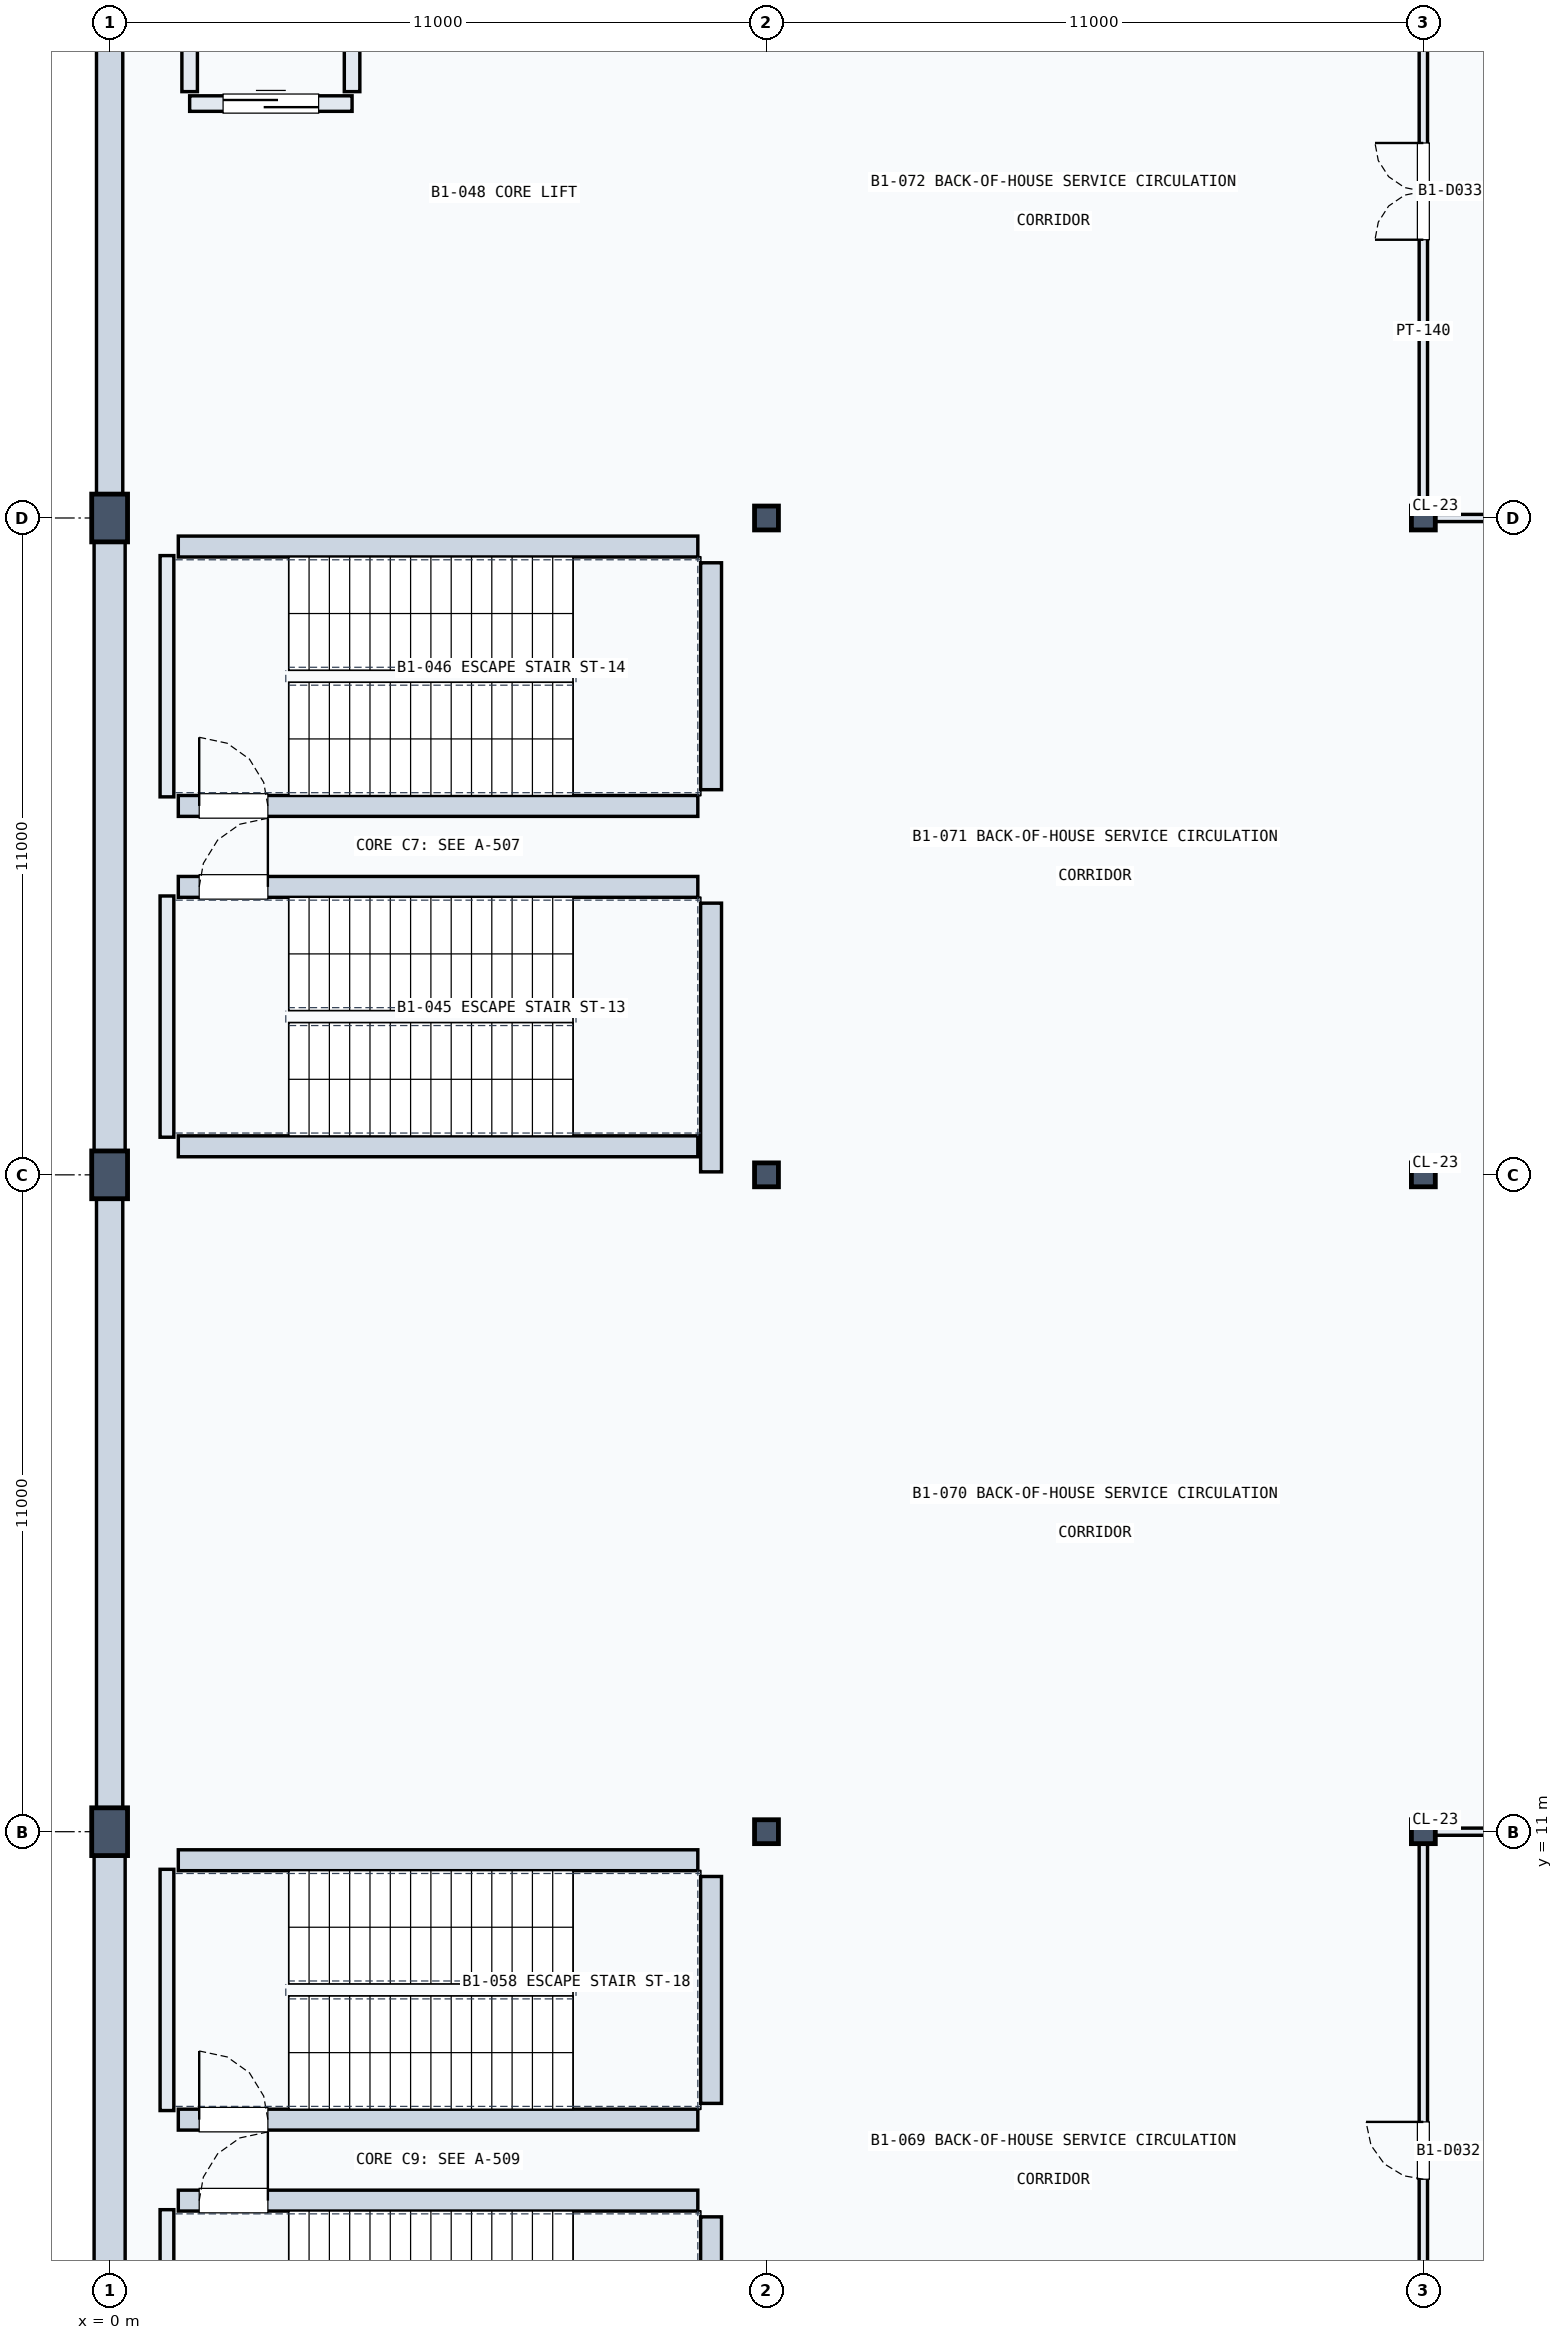
"""IFC4 building model, lengths in metres.
Left out: names, types, materials, properties, quantities, classifications, styles, units other than length and angle.
Written with IfcOpenShell. Run it as: python <this file> out.ifc"""

import sys

from ifc_helpers import new_model, si_unit, direction, frame, frame_2d, origin, origin_2d, place, context, subcontext, project, spatial, rectangle, hollow_rectangle, extrude, element, fill, save


model = new_model("IFC4")
c1 = context("Model", 3, precision=1e-05, world=origin(), true_north=direction((0.0, 1.0)))
c2 = subcontext(c1, "Body", "Model", "MODEL_VIEW")
j1 = project(units=[si_unit("LENGTHUNIT", "METRE"), si_unit("PLANEANGLEUNIT", "RADIAN")], contexts=[c1])
p1 = place(None, origin())
s1 = spatial("IfcSite", under=j1, at=p1, CompositionType="ELEMENT")
p2 = place(p1, origin())
s2 = spatial("IfcBuilding", under=s1, at=p2, CompositionType="ELEMENT")
p3 = place(p2, frame((0.0, 0.0, -5.4)))
s3 = spatial("IfcBuildingStorey", under=s2, at=p3, CompositionType="ELEMENT", Elevation=-5.4)
for number, where, z_axis, x_axis in (
    (1, (0.0, 11.0, 0.0), (0.0, 0.0, 1.0), (1.0, 0.0, 0.0)),
    (2, (0.0, 22.0, 0.0), (0.0, 0.0, 1.0), (1.0, 0.0, 0.0)),
    (3, (0.0, 33.0, 0.0), (0.0, 0.0, 1.0), (1.0, 0.0, 0.0)),
):
    element("IfcColumn", number, at=place(p3, frame(where, z_axis=z_axis, x_axis=x_axis)), inside=s3, PredefinedType="COLUMN", context=c2, shape_type="SweptSolid", body=[
        extrude(rectangle(XDim=0.6, YDim=0.8, at=origin_2d()), origin(), (0.0, 0.0, 1.0), 5.4),
    ])
for number, where, z_axis, x_axis in (
    (4, (11.0, 11.0, 0.0), (0.0, 0.0, 1.0), (1.0, 0.0, 0.0)),
    (5, (11.0, 22.0, 0.0), (0.0, 0.0, 1.0), (1.0, 0.0, 0.0)),
    (6, (11.0, 33.0, 0.0), (0.0, 0.0, 1.0), (1.0, 0.0, 0.0)),
    (7, (22.0, 11.0, 0.0), (0.0, 0.0, 1.0), (1.0, 0.0, 0.0)),
    (8, (22.0, 22.0, 0.0), (0.0, 0.0, 1.0), (1.0, 0.0, 0.0)),
    (9, (22.0, 33.0, 0.0), (0.0, 0.0, 1.0), (1.0, 0.0, 0.0)),
):
    element("IfcColumn", number, at=place(p3, frame(where, z_axis=z_axis, x_axis=x_axis)), inside=s3, PredefinedType="COLUMN", context=c2, shape_type="SweptSolid", body=[
        extrude(hollow_rectangle(XDim=0.4, YDim=0.4, WallThickness=0.02, at=origin_2d()), origin(), (0.0, 0.0, 1.0), 5.4),
    ])
p4 = place(p3, frame((0.0, 0.22, 0.0), z_axis=(0.0, 0.0, 1.0), x_axis=(0.0, 1.0, 0.0)))
e10 = element("IfcWall", 10, at=p4, inside=s3, PredefinedType="SOLIDWALL", context=c2, shape_type="SweptSolid", body=[
    extrude(rectangle(XDim=10.56, YDim=0.52, at=frame_2d((5.28, 0.0))), origin(), (0.0, 0.0, 1.0), 4.23),
])
p5 = place(p3, frame((0.0, 11.22, 0.0), z_axis=(0.0, 0.0, 1.0), x_axis=(0.0, 1.0, 0.0)))
e11 = element("IfcWall", 11, at=p5, inside=s3, PredefinedType="SOLIDWALL", context=c2, shape_type="SweptSolid", body=[
    extrude(rectangle(XDim=10.56, YDim=0.44, at=frame_2d((5.28, 0.0))), origin(), (0.0, 0.0, 1.0), 4.23),
])
p6 = place(p3, frame((0.0, 22.22, 0.0), z_axis=(0.0, 0.0, 1.0), x_axis=(0.0, 1.0, 0.0)))
e12 = element("IfcWall", 12, at=p6, inside=s3, PredefinedType="SOLIDWALL", context=c2, shape_type="SweptSolid", body=[
    extrude(rectangle(XDim=10.56, YDim=0.52, at=frame_2d((5.28, 0.0))), origin(), (0.0, 0.0, 1.0), 4.33),
])
p7 = place(p3, frame((0.0, 33.22, 0.0), z_axis=(0.0, 0.0, 1.0), x_axis=(0.0, 1.0, 0.0)))
e13 = element("IfcWall", 13, at=p7, inside=s3, PredefinedType="SOLIDWALL", context=c2, shape_type="SweptSolid", body=[
    extrude(rectangle(XDim=10.56, YDim=0.44, at=frame_2d((5.28, 0.0))), origin(), (0.0, 0.0, 1.0), 4.346),
])
p8 = place(p3, frame((0.96, 22.63, 0.0), z_axis=(0.0, 0.0, 1.0), x_axis=(0.0, 1.0, 0.0)))
e14 = element("IfcWall", 14, at=p8, inside=s3, PredefinedType="SOLIDWALL", context=c2, shape_type="SweptSolid", body=[
    extrude(rectangle(XDim=4.04, YDim=0.23, at=frame_2d((2.02, 0.0))), origin(), (0.0, 0.0, 1.0), 5.04),
])
p9 = place(p3, frame((10.072, 22.05, 0.0), z_axis=(0.0, 0.0, 1.0), x_axis=(0.0, 1.0, 0.0)))
e15 = element("IfcWall", 15, at=p9, inside=s3, PredefinedType="SOLIDWALL", context=c2, shape_type="SweptSolid", body=[
    extrude(rectangle(XDim=4.5, YDim=0.35, at=frame_2d((2.25, 0.0))), origin(), (0.0, 0.0, 1.0), 5.04),
])
p10 = place(p3, frame((1.15, 22.478, 0.0), z_axis=(0.0, 0.0, 1.0), x_axis=(1.0, 0.0, 0.0)))
e16 = element("IfcWall", 16, at=p10, inside=s3, PredefinedType="SOLIDWALL", context=c2, shape_type="SweptSolid", body=[
    extrude(rectangle(XDim=8.7, YDim=0.35, at=frame_2d((4.35, 0.0))), origin(), (0.0, 0.0, 1.0), 5.04),
])
p11 = place(p3, frame((1.15, 26.822, 0.0), z_axis=(0.0, 0.0, 1.0), x_axis=(1.0, 0.0, 0.0)))
e17 = element("IfcWall", 17, at=p11, inside=s3, PredefinedType="SOLIDWALL", context=c2, shape_type="SweptSolid", body=[
    extrude(rectangle(XDim=8.7, YDim=0.35, at=frame_2d((4.35, 0.0))), origin(), (0.0, 0.0, 1.0), 5.04),
])
p12 = place(p11, frame((0.35, 0.0, 0.0)))
e18 = element("IfcOpeningElement", 18, at=p12, cuts=e17, PredefinedType="OPENING", context=c2, shape_type="SweptSolid", body=[
    extrude(rectangle(XDim=1.15, YDim=2.2, at=frame_2d((0.575, 1.1))), frame((0.0, 0.185, 0.0), z_axis=(0.0, -1.0, 0.0), x_axis=(1.0, 0.0, 0.0)), (0.0, 0.0, 1.0), 0.37),
])
p13 = place(p3, frame((0.96, 28.33, 0.0), z_axis=(0.0, 0.0, 1.0), x_axis=(0.0, 1.0, 0.0)))
e19 = element("IfcWall", 19, at=p13, inside=s3, PredefinedType="SOLIDWALL", context=c2, shape_type="SweptSolid", body=[
    extrude(rectangle(XDim=4.04, YDim=0.23, at=frame_2d((2.02, 0.0))), origin(), (0.0, 0.0, 1.0), 5.04),
])
p14 = place(p3, frame((10.072, 28.45, 0.0), z_axis=(0.0, 0.0, 1.0), x_axis=(0.0, 1.0, 0.0)))
e20 = element("IfcWall", 20, at=p14, inside=s3, PredefinedType="SOLIDWALL", context=c2, shape_type="SweptSolid", body=[
    extrude(rectangle(XDim=3.8, YDim=0.35, at=frame_2d((1.9, 0.0))), origin(), (0.0, 0.0, 1.0), 5.04),
])
p15 = place(p3, frame((1.15, 28.178, 0.0), z_axis=(0.0, 0.0, 1.0), x_axis=(1.0, 0.0, 0.0)))
e21 = element("IfcWall", 21, at=p15, inside=s3, PredefinedType="SOLIDWALL", context=c2, shape_type="SweptSolid", body=[
    extrude(rectangle(XDim=8.7, YDim=0.35, at=frame_2d((4.35, 0.0))), origin(), (0.0, 0.0, 1.0), 5.04),
])
p16 = place(p15, frame((0.35, 0.0, 0.0)))
e22 = element("IfcOpeningElement", 22, at=p16, cuts=e21, PredefinedType="OPENING", context=c2, shape_type="SweptSolid", body=[
    extrude(rectangle(XDim=1.15, YDim=2.2, at=frame_2d((0.575, 1.1))), frame((0.0, 0.185, 0.0), z_axis=(0.0, -1.0, 0.0), x_axis=(1.0, 0.0, 0.0)), (0.0, 0.0, 1.0), 0.37),
])
p17 = place(p3, frame((1.15, 32.522, 0.0), z_axis=(0.0, 0.0, 1.0), x_axis=(1.0, 0.0, 0.0)))
e23 = element("IfcWall", 23, at=p17, inside=s3, PredefinedType="SOLIDWALL", context=c2, shape_type="SweptSolid", body=[
    extrude(rectangle(XDim=8.7, YDim=0.35, at=frame_2d((4.35, 0.0))), origin(), (0.0, 0.0, 1.0), 5.04),
])
p18 = place(p3, frame((1.34, 39.94, 0.0), z_axis=(0.0, 0.0, 1.0), x_axis=(1.0, 0.0, 0.0)))
e24 = element("IfcWall", 24, at=p18, inside=s3, PredefinedType="SOLIDWALL", context=c2, shape_type="SweptSolid", body=[
    extrude(rectangle(XDim=2.72, YDim=0.26, at=frame_2d((1.36, 0.0))), origin(), (0.0, 0.0, 1.0), 5.04),
])
p19 = place(p18, frame((0.56, 0.0, 0.0)))
e25 = element("IfcOpeningElement", 25, at=p19, cuts=e24, PredefinedType="OPENING", context=c2, shape_type="SweptSolid", body=[
    extrude(rectangle(XDim=1.6, YDim=2.35, at=frame_2d((0.8, 1.175))), frame((0.0, 0.14, 0.0), z_axis=(0.0, -1.0, 0.0), x_axis=(1.0, 0.0, 0.0)), (0.0, 0.0, 1.0), 0.28),
])
for number, where, z_axis, x_axis in (
    (26, (1.34, 40.14, 0.0), (0.0, 0.0, 1.0), (0.0, 1.0, 0.0)),
    (27, (4.06, 40.14, 0.0), (0.0, 0.0, 1.0), (0.0, 1.0, 0.0)),
):
    element("IfcWall", number, at=place(p3, frame(where, z_axis=z_axis, x_axis=x_axis)), inside=s3, PredefinedType="SOLIDWALL", context=c2, shape_type="SweptSolid", body=[
        extrude(rectangle(XDim=2.92, YDim=0.26, at=frame_2d((1.46, 0.0))), origin(), (0.0, 0.0, 1.0), 5.04),
    ])
p20 = place(p3, frame((0.96, 0.63, 0.0), z_axis=(0.0, 0.0, 1.0), x_axis=(0.0, 1.0, 0.0)))
e28 = element("IfcWall", 28, at=p20, inside=s3, PredefinedType="SOLIDWALL", context=c2, shape_type="SweptSolid", body=[
    extrude(rectangle(XDim=4.04, YDim=0.23, at=frame_2d((2.02, 0.0))), origin(), (0.0, 0.0, 1.0), 5.04),
])
p21 = place(p3, frame((10.072, 0.05, 0.0), z_axis=(0.0, 0.0, 1.0), x_axis=(0.0, 1.0, 0.0)))
e29 = element("IfcWall", 29, at=p21, inside=s3, PredefinedType="SOLIDWALL", context=c2, shape_type="SweptSolid", body=[
    extrude(rectangle(XDim=4.5, YDim=0.35, at=frame_2d((2.25, 0.0))), origin(), (0.0, 0.0, 1.0), 5.04),
])
p22 = place(p3, frame((1.15, 4.822, 0.0), z_axis=(0.0, 0.0, 1.0), x_axis=(1.0, 0.0, 0.0)))
e30 = element("IfcWall", 30, at=p22, inside=s3, PredefinedType="SOLIDWALL", context=c2, shape_type="SweptSolid", body=[
    extrude(rectangle(XDim=8.7, YDim=0.35, at=frame_2d((4.35, 0.0))), origin(), (0.0, 0.0, 1.0), 5.04),
])
p23 = place(p22, frame((0.35, 0.0, 0.0)))
e31 = element("IfcOpeningElement", 31, at=p23, cuts=e30, PredefinedType="OPENING", context=c2, shape_type="SweptSolid", body=[
    extrude(rectangle(XDim=1.15, YDim=2.2, at=frame_2d((0.575, 1.1))), frame((0.0, 0.185, 0.0), z_axis=(0.0, -1.0, 0.0), x_axis=(1.0, 0.0, 0.0)), (0.0, 0.0, 1.0), 0.37),
])
p24 = place(p3, frame((0.96, 6.33, 0.0), z_axis=(0.0, 0.0, 1.0), x_axis=(0.0, 1.0, 0.0)))
e32 = element("IfcWall", 32, at=p24, inside=s3, PredefinedType="SOLIDWALL", context=c2, shape_type="SweptSolid", body=[
    extrude(rectangle(XDim=4.04, YDim=0.23, at=frame_2d((2.02, 0.0))), origin(), (0.0, 0.0, 1.0), 5.04),
])
p25 = place(p3, frame((10.072, 6.45, 0.0), z_axis=(0.0, 0.0, 1.0), x_axis=(0.0, 1.0, 0.0)))
e33 = element("IfcWall", 33, at=p25, inside=s3, PredefinedType="SOLIDWALL", context=c2, shape_type="SweptSolid", body=[
    extrude(rectangle(XDim=3.8, YDim=0.35, at=frame_2d((1.9, 0.0))), origin(), (0.0, 0.0, 1.0), 5.04),
])
p26 = place(p3, frame((1.15, 6.178, 0.0), z_axis=(0.0, 0.0, 1.0), x_axis=(1.0, 0.0, 0.0)))
e34 = element("IfcWall", 34, at=p26, inside=s3, PredefinedType="SOLIDWALL", context=c2, shape_type="SweptSolid", body=[
    extrude(rectangle(XDim=8.7, YDim=0.35, at=frame_2d((4.35, 0.0))), origin(), (0.0, 0.0, 1.0), 5.04),
])
p27 = place(p26, frame((0.35, 0.0, 0.0)))
e35 = element("IfcOpeningElement", 35, at=p27, cuts=e34, PredefinedType="OPENING", context=c2, shape_type="SweptSolid", body=[
    extrude(rectangle(XDim=1.15, YDim=2.2, at=frame_2d((0.575, 1.1))), frame((0.0, 0.185, 0.0), z_axis=(0.0, -1.0, 0.0), x_axis=(1.0, 0.0, 0.0)), (0.0, 0.0, 1.0), 0.37),
])
p28 = place(p3, frame((1.15, 10.522, 0.0), z_axis=(0.0, 0.0, 1.0), x_axis=(1.0, 0.0, 0.0)))
e36 = element("IfcWall", 36, at=p28, inside=s3, PredefinedType="SOLIDWALL", context=c2, shape_type="SweptSolid", body=[
    extrude(rectangle(XDim=8.7, YDim=0.35, at=frame_2d((4.35, 0.0))), origin(), (0.0, 0.0, 1.0), 5.04),
])
p29 = place(p3, frame((22.0, 0.48, 0.0), z_axis=(0.0, 0.0, 1.0), x_axis=(0.0, 1.0, 0.0)))
e37 = element("IfcWall", 37, at=p29, inside=s3, PredefinedType="PARTITIONING", context=c2, shape_type="SweptSolid", body=[
    extrude(rectangle(XDim=10.36, YDim=0.14, at=frame_2d((5.18, 0.0))), origin(), (0.0, 0.0, 1.0), 4.28),
])
p30 = place(p29, frame((4.7, 0.0, 0.0)))
e38 = element("IfcOpeningElement", 38, at=p30, cuts=e37, PredefinedType="OPENING", context=c2, shape_type="SweptSolid", body=[
    extrude(rectangle(XDim=0.96, YDim=2.15, at=frame_2d((0.48, 1.075))), frame((0.0, 0.08, 0.0), z_axis=(0.0, -1.0, 0.0), x_axis=(1.0, 0.0, 0.0)), (0.0, 0.0, 1.0), 0.16),
])
p31 = place(p3, frame((22.0, 33.16, 0.0), z_axis=(0.0, 0.0, 1.0), x_axis=(0.0, 1.0, 0.0)))
e39 = element("IfcWall", 39, at=p31, inside=s3, PredefinedType="PARTITIONING", context=c2, shape_type="SweptSolid", body=[
    extrude(rectangle(XDim=10.62, YDim=0.14, at=frame_2d((5.31, 0.0))), origin(), (0.0, 0.0, 1.0), 4.41),
])
p32 = place(p31, frame((4.5, 0.0, 0.0)))
e40 = element("IfcOpeningElement", 40, at=p32, cuts=e39, PredefinedType="OPENING", context=c2, shape_type="SweptSolid", body=[
    extrude(rectangle(XDim=1.62, YDim=2.25, at=frame_2d((0.81, 1.125))), frame((0.0, 0.08, 0.0), z_axis=(0.0, -1.0, 0.0), x_axis=(1.0, 0.0, 0.0)), (0.0, 0.0, 1.0), 0.16),
])
p33 = place(p3, frame((22.16, 11.0, 0.0), z_axis=(0.0, 0.0, 1.0), x_axis=(1.0, 0.0, 0.0)))
e41 = element("IfcWall", 41, at=p33, inside=s3, PredefinedType="PARTITIONING", context=c2, shape_type="SweptSolid", body=[
    extrude(rectangle(XDim=11.62, YDim=0.12, at=frame_2d((5.81, 0.0))), origin(), (0.0, 0.0, 1.0), 4.28),
])
p34 = place(p3, frame((22.16, 33.0, 0.0), z_axis=(0.0, 0.0, 1.0), x_axis=(1.0, 0.0, 0.0)))
e42 = element("IfcWall", 42, at=p34, inside=s3, PredefinedType="PARTITIONING", context=c2, shape_type="SweptSolid", body=[
    extrude(rectangle(XDim=11.62, YDim=0.12, at=frame_2d((5.81, 0.0))), origin(), (0.0, 0.0, 1.0), 4.13),
])
p35 = place(p12, origin())
e43 = element("IfcDoor", 43, at=p35, inside=s3, OperationType="SINGLE_SWING_RIGHT", PredefinedType="DOOR", context=c2, shape_type="SweptSolid", body=[
    extrude(rectangle(XDim=1.15, YDim=2.2, at=frame_2d((0.575, 1.1))), frame((0.0, 0.025, 0.0), z_axis=(0.0, -1.0, 0.0), x_axis=(1.0, 0.0, 0.0)), (0.0, 0.0, 1.0), 0.05),
])
fill(e18, e43)
p36 = place(p16, origin())
e44 = element("IfcDoor", 44, at=p36, inside=s3, OperationType="SINGLE_SWING_LEFT", PredefinedType="DOOR", context=c2, shape_type="SweptSolid", body=[
    extrude(rectangle(XDim=1.15, YDim=2.2, at=frame_2d((0.575, 1.1))), frame((0.0, 0.025, 0.0), z_axis=(0.0, -1.0, 0.0), x_axis=(1.0, 0.0, 0.0)), (0.0, 0.0, 1.0), 0.05),
])
fill(e22, e44)
p37 = place(p19, origin())
e45 = element("IfcDoor", 45, at=p37, inside=s3, OperationType="DOUBLE_DOOR_SLIDING", PredefinedType="DOOR", context=c2, shape_type="SweptSolid", body=[
    extrude(rectangle(XDim=1.6, YDim=2.35, at=frame_2d((0.8, 1.175))), frame((0.0, 0.025, 0.0), z_axis=(0.0, -1.0, 0.0), x_axis=(1.0, 0.0, 0.0)), (0.0, 0.0, 1.0), 0.05),
])
fill(e25, e45)
p38 = place(p23, origin())
e46 = element("IfcDoor", 46, at=p38, inside=s3, OperationType="SINGLE_SWING_RIGHT", PredefinedType="DOOR", context=c2, shape_type="SweptSolid", body=[
    extrude(rectangle(XDim=1.15, YDim=2.2, at=frame_2d((0.575, 1.1))), frame((0.0, 0.025, 0.0), z_axis=(0.0, -1.0, 0.0), x_axis=(1.0, 0.0, 0.0)), (0.0, 0.0, 1.0), 0.05),
])
fill(e31, e46)
p39 = place(p27, origin())
e47 = element("IfcDoor", 47, at=p39, inside=s3, OperationType="SINGLE_SWING_LEFT", PredefinedType="DOOR", context=c2, shape_type="SweptSolid", body=[
    extrude(rectangle(XDim=1.15, YDim=2.2, at=frame_2d((0.575, 1.1))), frame((0.0, 0.025, 0.0), z_axis=(0.0, -1.0, 0.0), x_axis=(1.0, 0.0, 0.0)), (0.0, 0.0, 1.0), 0.05),
])
fill(e35, e47)
p40 = place(p30, origin())
e48 = element("IfcDoor", 48, at=p40, inside=s3, OperationType="SINGLE_SWING_RIGHT", PredefinedType="DOOR", context=c2, shape_type="SweptSolid", body=[
    extrude(rectangle(XDim=0.96, YDim=2.15, at=frame_2d((0.48, 1.075))), frame((0.0, 0.025, 0.0), z_axis=(0.0, -1.0, 0.0), x_axis=(1.0, 0.0, 0.0)), (0.0, 0.0, 1.0), 0.05),
])
fill(e38, e48)
p41 = place(p32, origin())
e49 = element("IfcDoor", 49, at=p41, inside=s3, OperationType="DOUBLE_DOOR_SINGLE_SWING", PredefinedType="DOOR", context=c2, shape_type="SweptSolid", body=[
    extrude(rectangle(XDim=1.62, YDim=2.25, at=frame_2d((0.81, 1.125))), frame((0.0, 0.025, 0.0), z_axis=(0.0, -1.0, 0.0), x_axis=(1.0, 0.0, 0.0)), (0.0, 0.0, 1.0), 0.05),
])
fill(e40, e49)
save(model, sys.argv[1])
